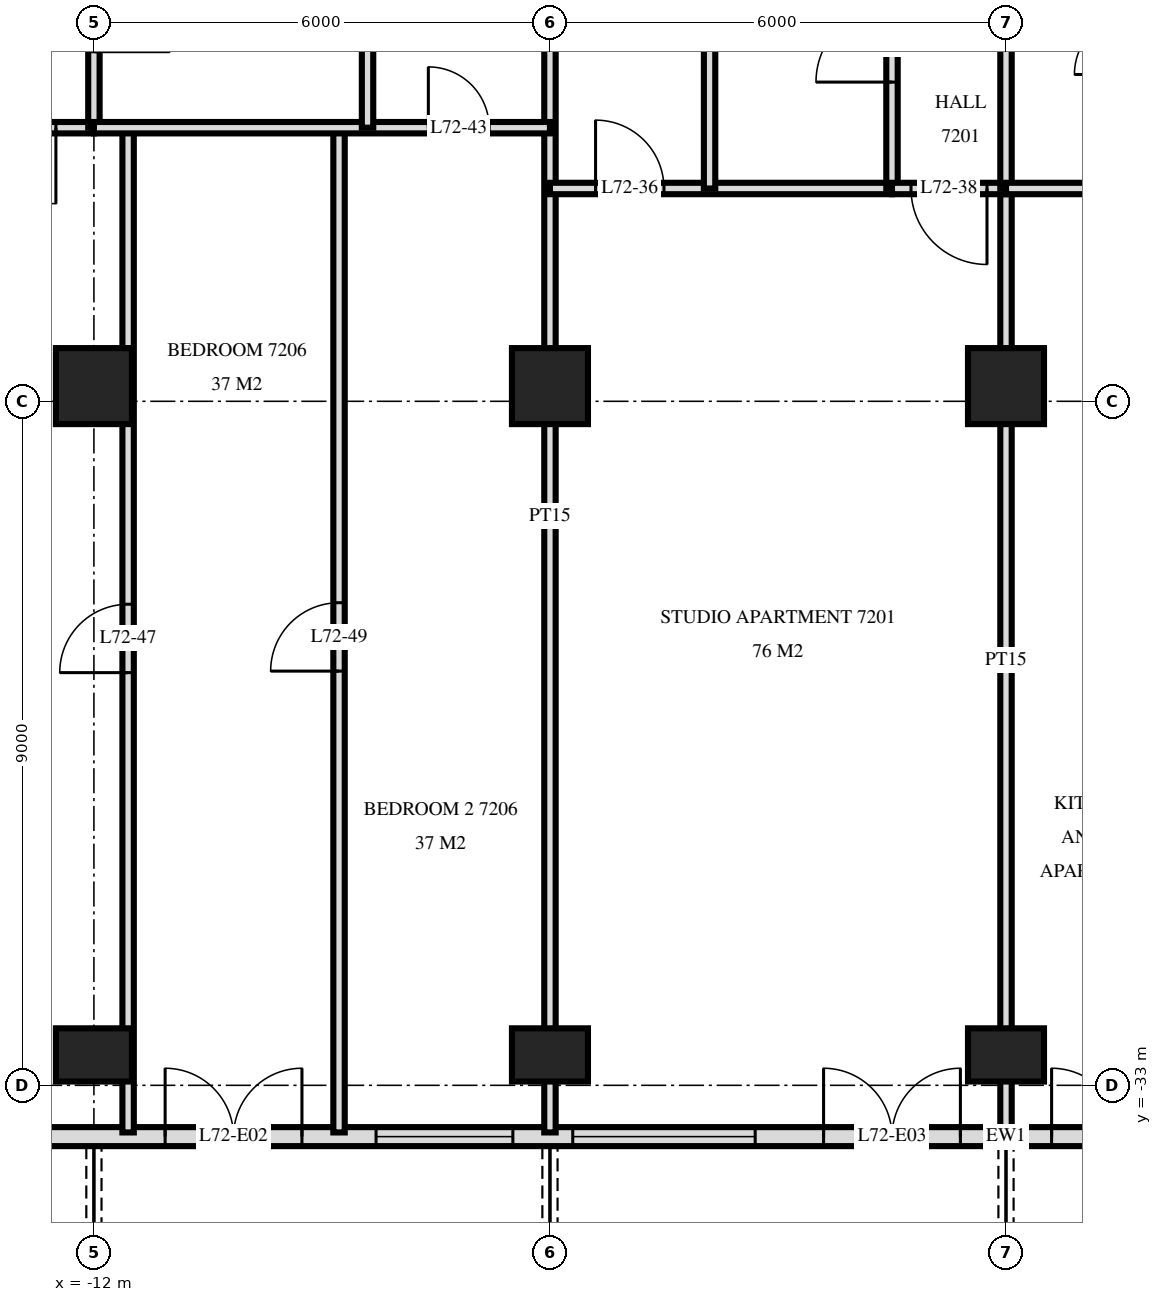
"""IFC4 building model, lengths in metres.
Left out: names, types, materials, properties, quantities, classifications, styles, units other than length and angle.
Written with IfcOpenShell. Run it as: python <this file> out.ifc"""

import sys

from ifc_helpers import new_model, si_unit, direction, frame, frame_2d, origin, origin_2d, place, context, subcontext, project, spatial, rectangle, extrude, element, fill, save


model = new_model("IFC4")
c1 = context("Model", 3, precision=1e-05, world=origin(), true_north=direction((0.0, 1.0)))
c2 = subcontext(c1, "Body", "Model", "MODEL_VIEW")
j1 = project(units=[si_unit("LENGTHUNIT", "METRE"), si_unit("PLANEANGLEUNIT", "RADIAN")], contexts=[c1])
p1 = place(None, origin())
s1 = spatial("IfcSite", under=j1, at=p1, CompositionType="ELEMENT")
p2 = place(p1, origin())
s2 = spatial("IfcBuilding", under=s1, at=p2, CompositionType="ELEMENT")
p3 = place(p2, frame((0.0, 0.0, 273.6)))
s3 = spatial("IfcBuildingStorey", under=s2, at=p3, CompositionType="ELEMENT", Elevation=273.6)
p4 = place(p3, frame((-12.0, -32.6, 0.0), z_axis=(0.0, 0.0, 1.0), x_axis=(1.0, 0.0, 0.0)))
e1 = element("IfcColumn", 1, at=p4, inside=s3, PredefinedType="COLUMN", context=c2, shape_type="SweptSolid", body=[
    extrude(rectangle(XDim=1.0, YDim=0.7, at=origin_2d()), origin(), (0.0, 0.0, 1.0), 3.5),
])
p5 = place(p3, frame((-12.0, -23.8, 0.0), z_axis=(0.0, 0.0, 1.0), x_axis=(1.0, 0.0, 0.0)))
e2 = element("IfcColumn", 2, at=p5, inside=s3, PredefinedType="COLUMN", context=c2, shape_type="SweptSolid", body=[
    extrude(rectangle(XDim=1.0, YDim=1.0, at=origin_2d()), origin(), (0.0, 0.0, 1.0), 3.5),
])
p6 = place(p3, frame((-6.0, -32.6, 0.0), z_axis=(0.0, 0.0, 1.0), x_axis=(1.0, 0.0, 0.0)))
e3 = element("IfcColumn", 3, at=p6, inside=s3, PredefinedType="COLUMN", context=c2, shape_type="SweptSolid", body=[
    extrude(rectangle(XDim=1.0, YDim=0.7, at=origin_2d()), origin(), (0.0, 0.0, 1.0), 3.5),
])
p7 = place(p3, frame((-6.0, -23.8, 0.0), z_axis=(0.0, 0.0, 1.0), x_axis=(1.0, 0.0, 0.0)))
e4 = element("IfcColumn", 4, at=p7, inside=s3, PredefinedType="COLUMN", context=c2, shape_type="SweptSolid", body=[
    extrude(rectangle(XDim=1.0, YDim=1.0, at=origin_2d()), origin(), (0.0, 0.0, 1.0), 3.5),
])
p8 = place(p3, frame((0.0, -32.6, 0.0), z_axis=(0.0, 0.0, 1.0), x_axis=(1.0, 0.0, 0.0)))
e5 = element("IfcColumn", 5, at=p8, inside=s3, PredefinedType="COLUMN", context=c2, shape_type="SweptSolid", body=[
    extrude(rectangle(XDim=1.0, YDim=0.7, at=origin_2d()), origin(), (0.0, 0.0, 1.0), 3.5),
])
p9 = place(p3, frame((0.0, -23.8, 0.0), z_axis=(0.0, 0.0, 1.0), x_axis=(1.0, 0.0, 0.0)))
e6 = element("IfcColumn", 6, at=p9, inside=s3, PredefinedType="COLUMN", context=c2, shape_type="SweptSolid", body=[
    extrude(rectangle(XDim=1.0, YDim=1.0, at=origin_2d()), origin(), (0.0, 0.0, 1.0), 3.5),
])
p10 = place(p3, frame((-18.575, -33.675, 0.0), z_axis=(0.0, 0.0, 1.0), x_axis=(1.0, 0.0, 0.0)))
e7 = element("IfcWall", 7, at=p10, inside=s3, PredefinedType="SOLIDWALL", context=c2, shape_type="SweptSolid", body=[
    extrude(rectangle(XDim=37.151, YDim=0.25, at=frame_2d((18.575, 0.0))), origin(), (0.0, 0.0, 1.0), 3.22),
])
p11 = place(p10, frame((4.175, 0.0, 0.0)))
e8 = element("IfcOpeningElement", 8, at=p11, cuts=e7, PredefinedType="OPENING", context=c2, shape_type="SweptSolid", body=[
    extrude(rectangle(XDim=1.8, YDim=2.4, at=frame_2d((0.9, 1.2))), frame((0.0, 0.135, 0.0), z_axis=(0.0, -1.0, 0.0), x_axis=(1.0, 0.0, 0.0)), (0.0, 0.0, 1.0), 0.27),
])
p12 = place(p10, frame((7.512, 0.0, 0.0)))
e9 = element("IfcOpeningElement", 9, at=p12, cuts=e7, PredefinedType="OPENING", context=c2, shape_type="SweptSolid", body=[
    extrude(rectangle(XDim=1.8, YDim=2.4, at=frame_2d((0.9, 1.2))), frame((0.0, 0.135, 0.0), z_axis=(0.0, -1.0, 0.0), x_axis=(1.0, 0.0, 0.0)), (0.0, 0.0, 1.0), 0.27),
])
p13 = place(p10, frame((10.287, 0.0, 0.9)))
e10 = element("IfcOpeningElement", 10, at=p13, cuts=e7, PredefinedType="OPENING", context=c2, shape_type="SweptSolid", body=[
    extrude(rectangle(XDim=1.8, YDim=1.5, at=frame_2d((0.9, 0.75))), frame((0.0, 0.135, 0.0), z_axis=(0.0, -1.0, 0.0), x_axis=(1.0, 0.0, 0.0)), (0.0, 0.0, 1.0), 0.27),
])
p14 = place(p10, frame((12.875, 0.0, 0.9)))
e11 = element("IfcOpeningElement", 11, at=p14, cuts=e7, PredefinedType="OPENING", context=c2, shape_type="SweptSolid", body=[
    extrude(rectangle(XDim=2.4, YDim=1.5, at=frame_2d((1.2, 0.75))), frame((0.0, 0.135, 0.0), z_axis=(0.0, -1.0, 0.0), x_axis=(1.0, 0.0, 0.0)), (0.0, 0.0, 1.0), 0.27),
])
p15 = place(p10, frame((16.175, 0.0, 0.0)))
e12 = element("IfcOpeningElement", 12, at=p15, cuts=e7, PredefinedType="OPENING", context=c2, shape_type="SweptSolid", body=[
    extrude(rectangle(XDim=1.8, YDim=2.4, at=frame_2d((0.9, 1.2))), frame((0.0, 0.135, 0.0), z_axis=(0.0, -1.0, 0.0), x_axis=(1.0, 0.0, 0.0)), (0.0, 0.0, 1.0), 0.27),
])
p16 = place(p10, frame((19.175, 0.0, 0.0)))
e13 = element("IfcOpeningElement", 13, at=p16, cuts=e7, PredefinedType="OPENING", context=c2, shape_type="SweptSolid", body=[
    extrude(rectangle(XDim=1.8, YDim=2.4, at=frame_2d((0.9, 1.2))), frame((0.0, 0.135, 0.0), z_axis=(0.0, -1.0, 0.0), x_axis=(1.0, 0.0, 0.0)), (0.0, 0.0, 1.0), 0.27),
])
p17 = place(p10, frame((21.875, 0.0, 0.9)))
e14 = element("IfcOpeningElement", 14, at=p17, cuts=e7, PredefinedType="OPENING", context=c2, shape_type="SweptSolid", body=[
    extrude(rectangle(XDim=2.4, YDim=1.5, at=frame_2d((1.2, 0.75))), frame((0.0, 0.135, 0.0), z_axis=(0.0, -1.0, 0.0), x_axis=(1.0, 0.0, 0.0)), (0.0, 0.0, 1.0), 0.27),
])
p18 = place(p10, frame((25.175, 0.0, 0.0)))
e15 = element("IfcOpeningElement", 15, at=p18, cuts=e7, PredefinedType="OPENING", context=c2, shape_type="SweptSolid", body=[
    extrude(rectangle(XDim=1.8, YDim=2.4, at=frame_2d((0.9, 1.2))), frame((0.0, 0.135, 0.0), z_axis=(0.0, -1.0, 0.0), x_axis=(1.0, 0.0, 0.0)), (0.0, 0.0, 1.0), 0.27),
])
p19 = place(p10, frame((27.875, 0.0, 0.9)))
e16 = element("IfcOpeningElement", 16, at=p19, cuts=e7, PredefinedType="OPENING", context=c2, shape_type="SweptSolid", body=[
    extrude(rectangle(XDim=2.4, YDim=1.5, at=frame_2d((1.2, 0.75))), frame((0.0, 0.135, 0.0), z_axis=(0.0, -1.0, 0.0), x_axis=(1.0, 0.0, 0.0)), (0.0, 0.0, 1.0), 0.27),
])
p20 = place(p10, frame((30.95, 0.0, 0.9)))
e17 = element("IfcOpeningElement", 17, at=p20, cuts=e7, PredefinedType="OPENING", context=c2, shape_type="SweptSolid", body=[
    extrude(rectangle(XDim=1.8, YDim=1.5, at=frame_2d((0.9, 0.75))), frame((0.0, 0.135, 0.0), z_axis=(0.0, -1.0, 0.0), x_axis=(1.0, 0.0, 0.0)), (0.0, 0.0, 1.0), 0.27),
])
p21 = place(p10, frame((34.175, 0.0, 0.0)))
e18 = element("IfcOpeningElement", 18, at=p21, cuts=e7, PredefinedType="OPENING", context=c2, shape_type="SweptSolid", body=[
    extrude(rectangle(XDim=1.8, YDim=2.4, at=frame_2d((0.9, 1.2))), frame((0.0, 0.135, 0.0), z_axis=(0.0, -1.0, 0.0), x_axis=(1.0, 0.0, 0.0)), (0.0, 0.0, 1.0), 0.27),
])
p22 = place(p3, frame((0.0, -21.2, 0.0), z_axis=(0.0, 0.0, 1.0), x_axis=(0.0, 1.0, 0.0)))
e19 = element("IfcWall", 19, at=p22, inside=s3, PredefinedType="PARTITIONING", context=c2, shape_type="SweptSolid", body=[
    extrude(rectangle(XDim=3.8, YDim=0.15, at=frame_2d((1.9, 0.0))), origin(), (0.0, 0.0, 1.0), 3.22),
])
p23 = place(p3, frame((0.0, -33.62, 0.0), z_axis=(0.0, 0.0, 1.0), x_axis=(0.0, 1.0, 0.0)))
e20 = element("IfcWall", 20, at=p23, inside=s3, PredefinedType="PARTITIONING", context=c2, shape_type="SweptSolid", body=[
    extrude(rectangle(XDim=12.42, YDim=0.15, at=frame_2d((6.21, 0.0))), origin(), (0.0, 0.0, 1.0), 3.22),
])
p24 = place(p3, frame((-1.5, -21.2, 0.0), z_axis=(0.0, 0.0, 1.0), x_axis=(0.0, 1.0, 0.0)))
e21 = element("IfcWall", 21, at=p24, inside=s3, PredefinedType="PARTITIONING", context=c2, shape_type="SweptSolid", body=[
    extrude(rectangle(XDim=3.8, YDim=0.15, at=frame_2d((1.9, 0.0))), origin(), (0.0, 0.0, 1.0), 3.22),
])
p25 = place(p24, frame((1.4, 0.0, 0.0)))
e22 = element("IfcOpeningElement", 22, at=p25, cuts=e21, PredefinedType="OPENING", context=c2, shape_type="SweptSolid", body=[
    extrude(rectangle(XDim=1.0, YDim=2.1, at=frame_2d((0.5, 1.05))), frame((0.0, 0.085, 0.0), z_axis=(0.0, -1.0, 0.0), x_axis=(1.0, 0.0, 0.0)), (0.0, 0.0, 1.0), 0.17),
])
p26 = place(p3, frame((-3.9, -21.2, 0.0), z_axis=(0.0, 0.0, 1.0), x_axis=(0.0, 1.0, 0.0)))
e23 = element("IfcWall", 23, at=p26, inside=s3, PredefinedType="PARTITIONING", context=c2, shape_type="SweptSolid", body=[
    extrude(rectangle(XDim=3.8, YDim=0.15, at=frame_2d((1.9, 0.0))), origin(), (0.0, 0.0, 1.0), 3.22),
])
p27 = place(p3, frame((-6.0, -33.62, 0.0), z_axis=(0.0, 0.0, 1.0), x_axis=(0.0, 1.0, 0.0)))
e24 = element("IfcWall", 24, at=p27, inside=s3, PredefinedType="PARTITIONING", context=c2, shape_type="SweptSolid", body=[
    extrude(rectangle(XDim=16.22, YDim=0.15, at=frame_2d((8.11, 0.0))), origin(), (0.0, 0.0, 1.0), 3.22),
])
p28 = place(p3, frame((-8.4, -20.4, 0.0), z_axis=(0.0, 0.0, 1.0), x_axis=(0.0, 1.0, 0.0)))
e25 = element("IfcWall", 25, at=p28, inside=s3, PredefinedType="PARTITIONING", context=c2, shape_type="SweptSolid", body=[
    extrude(rectangle(XDim=3.0, YDim=0.15, at=frame_2d((1.5, 0.0))), origin(), (0.0, 0.0, 1.0), 3.22),
])
p29 = place(p3, frame((-8.775, -33.62, 0.0), z_axis=(0.0, 0.0, 1.0), x_axis=(0.0, 1.0, 0.0)))
e26 = element("IfcWall", 26, at=p29, inside=s3, PredefinedType="PARTITIONING", context=c2, shape_type="SweptSolid", body=[
    extrude(rectangle(XDim=13.22, YDim=0.15, at=frame_2d((6.61, 0.0))), origin(), (0.0, 0.0, 1.0), 3.22),
])
p30 = place(p29, frame((6.07, 0.0, 0.0)))
e27 = element("IfcOpeningElement", 27, at=p30, cuts=e26, PredefinedType="OPENING", context=c2, shape_type="SweptSolid", body=[
    extrude(rectangle(XDim=0.9, YDim=2.1, at=frame_2d((0.45, 1.05))), frame((0.0, 0.085, 0.0), z_axis=(0.0, -1.0, 0.0), x_axis=(1.0, 0.0, 0.0)), (0.0, 0.0, 1.0), 0.17),
])
p31 = place(p3, frame((-11.55, -33.62, 0.0), z_axis=(0.0, 0.0, 1.0), x_axis=(0.0, 1.0, 0.0)))
e28 = element("IfcWall", 28, at=p31, inside=s3, PredefinedType="PARTITIONING", context=c2, shape_type="SweptSolid", body=[
    extrude(rectangle(XDim=13.22, YDim=0.15, at=frame_2d((6.61, 0.0))), origin(), (0.0, 0.0, 1.0), 3.22),
])
p32 = place(p31, frame((6.05, 0.0, 0.0)))
e29 = element("IfcOpeningElement", 29, at=p32, cuts=e28, PredefinedType="OPENING", context=c2, shape_type="SweptSolid", body=[
    extrude(rectangle(XDim=0.9, YDim=2.1, at=frame_2d((0.45, 1.05))), frame((0.0, 0.085, 0.0), z_axis=(0.0, -1.0, 0.0), x_axis=(1.0, 0.0, 0.0)), (0.0, 0.0, 1.0), 0.17),
])
p33 = place(p3, frame((-12.0, -20.4, 0.0), z_axis=(0.0, 0.0, 1.0), x_axis=(0.0, 1.0, 0.0)))
e30 = element("IfcWall", 30, at=p33, inside=s3, PredefinedType="PARTITIONING", context=c2, shape_type="SweptSolid", body=[
    extrude(rectangle(XDim=3.0, YDim=0.15, at=frame_2d((1.5, 0.0))), origin(), (0.0, 0.0, 1.0), 3.22),
])
p34 = place(p33, frame((1.0, 0.0, 0.0)))
e31 = element("IfcOpeningElement", 31, at=p34, cuts=e30, PredefinedType="OPENING", context=c2, shape_type="SweptSolid", body=[
    extrude(rectangle(XDim=1.0, YDim=2.1, at=frame_2d((0.5, 1.05))), frame((0.0, 0.085, 0.0), z_axis=(0.0, -1.0, 0.0), x_axis=(1.0, 0.0, 0.0)), (0.0, 0.0, 1.0), 0.17),
])
p35 = place(p3, frame((-1.5, -21.2, 0.0), z_axis=(0.0, 0.0, 1.0), x_axis=(1.0, 0.0, 0.0)))
e32 = element("IfcWall", 32, at=p35, inside=s3, PredefinedType="PARTITIONING", context=c2, shape_type="SweptSolid", body=[
    extrude(rectangle(XDim=1.5, YDim=0.15, at=frame_2d((0.75, 0.0))), origin(), (0.0, 0.0, 1.0), 3.22),
])
p36 = place(p35, frame((0.25, 0.0, 0.0)))
e33 = element("IfcOpeningElement", 33, at=p36, cuts=e32, PredefinedType="OPENING", context=c2, shape_type="SweptSolid", body=[
    extrude(rectangle(XDim=1.0, YDim=2.1, at=frame_2d((0.5, 1.05))), frame((0.0, 0.085, 0.0), z_axis=(0.0, -1.0, 0.0), x_axis=(1.0, 0.0, 0.0)), (0.0, 0.0, 1.0), 0.17),
])
p37 = place(p3, frame((-6.0, -21.2, 0.0), z_axis=(0.0, 0.0, 1.0), x_axis=(1.0, 0.0, 0.0)))
e34 = element("IfcWall", 34, at=p37, inside=s3, PredefinedType="PARTITIONING", context=c2, shape_type="SweptSolid", body=[
    extrude(rectangle(XDim=4.5, YDim=0.15, at=frame_2d((2.25, 0.0))), origin(), (0.0, 0.0, 1.0), 3.22),
])
p38 = place(p37, frame((0.6, 0.0, 0.0)))
e35 = element("IfcOpeningElement", 35, at=p38, cuts=e34, PredefinedType="OPENING", context=c2, shape_type="SweptSolid", body=[
    extrude(rectangle(XDim=0.9, YDim=2.1, at=frame_2d((0.45, 1.05))), frame((0.0, 0.085, 0.0), z_axis=(0.0, -1.0, 0.0), x_axis=(1.0, 0.0, 0.0)), (0.0, 0.0, 1.0), 0.17),
])
p39 = place(p3, frame((0.0, -21.2, 0.0), z_axis=(0.0, 0.0, 1.0), x_axis=(1.0, 0.0, 0.0)))
e36 = element("IfcWall", 36, at=p39, inside=s3, PredefinedType="PARTITIONING", context=c2, shape_type="SweptSolid", body=[
    extrude(rectangle(XDim=1.7, YDim=0.15, at=frame_2d((0.85, 0.0))), origin(), (0.0, 0.0, 1.0), 3.22),
])
p40 = place(p3, frame((-14.0, -20.4, 0.0), z_axis=(0.0, 0.0, 1.0), x_axis=(1.0, 0.0, 0.0)))
e37 = element("IfcWall", 37, at=p40, inside=s3, PredefinedType="PARTITIONING", context=c2, shape_type="SweptSolid", body=[
    extrude(rectangle(XDim=2.0, YDim=0.15, at=frame_2d((1.0, 0.0))), origin(), (0.0, 0.0, 1.0), 3.22),
])
p41 = place(p40, frame((0.5, 0.0, 0.0)))
e38 = element("IfcOpeningElement", 38, at=p41, cuts=e37, PredefinedType="OPENING", context=c2, shape_type="SweptSolid", body=[
    extrude(rectangle(XDim=1.0, YDim=2.1, at=frame_2d((0.5, 1.05))), frame((0.0, 0.085, 0.0), z_axis=(0.0, -1.0, 0.0), x_axis=(1.0, 0.0, 0.0)), (0.0, 0.0, 1.0), 0.17),
])
p42 = place(p3, frame((-12.0, -20.4, 0.0), z_axis=(0.0, 0.0, 1.0), x_axis=(1.0, 0.0, 0.0)))
e39 = element("IfcWall", 39, at=p42, inside=s3, PredefinedType="PARTITIONING", context=c2, shape_type="SweptSolid", body=[
    extrude(rectangle(XDim=6.0, YDim=0.15, at=frame_2d((3.0, 0.0))), origin(), (0.0, 0.0, 1.0), 3.22),
])
p43 = place(p42, frame((4.4, 0.0, 0.0)))
e40 = element("IfcOpeningElement", 40, at=p43, cuts=e39, PredefinedType="OPENING", context=c2, shape_type="SweptSolid", body=[
    extrude(rectangle(XDim=0.8, YDim=2.1, at=frame_2d((0.4, 1.05))), frame((0.0, 0.085, 0.0), z_axis=(0.0, -1.0, 0.0), x_axis=(1.0, 0.0, 0.0)), (0.0, 0.0, 1.0), 0.17),
])
p44 = place(p12, origin())
e41 = element("IfcDoor", 41, at=p44, inside=s3, OperationType="DOUBLE_DOOR_SINGLE_SWING", PredefinedType="DOOR", context=c2, shape_type="SweptSolid", body=[
    extrude(rectangle(XDim=1.8, YDim=2.4, at=frame_2d((0.9, 1.2))), frame((0.0, 0.025, 0.0), z_axis=(0.0, -1.0, 0.0), x_axis=(1.0, 0.0, 0.0)), (0.0, 0.0, 1.0), 0.05),
])
fill(e9, e41)
p45 = place(p13, origin())
e42 = element("IfcWindow", 42, at=p45, inside=s3, PartitioningType="SINGLE_PANEL", PredefinedType="WINDOW", context=c2, shape_type="SweptSolid", body=[
    extrude(rectangle(XDim=1.8, YDim=1.5, at=frame_2d((0.9, 0.75))), frame((0.0, 0.03, 0.0), z_axis=(0.0, -1.0, 0.0), x_axis=(1.0, 0.0, 0.0)), (0.0, 0.0, 1.0), 0.06),
])
fill(e10, e42)
p46 = place(p14, origin())
e43 = element("IfcWindow", 43, at=p46, inside=s3, PartitioningType="SINGLE_PANEL", PredefinedType="WINDOW", context=c2, shape_type="SweptSolid", body=[
    extrude(rectangle(XDim=2.4, YDim=1.5, at=frame_2d((1.2, 0.75))), frame((0.0, 0.03, 0.0), z_axis=(0.0, -1.0, 0.0), x_axis=(1.0, 0.0, 0.0)), (0.0, 0.0, 1.0), 0.06),
])
fill(e11, e43)
p47 = place(p15, origin())
e44 = element("IfcDoor", 44, at=p47, inside=s3, OperationType="DOUBLE_DOOR_SINGLE_SWING", PredefinedType="DOOR", context=c2, shape_type="SweptSolid", body=[
    extrude(rectangle(XDim=1.8, YDim=2.4, at=frame_2d((0.9, 1.2))), frame((0.0, 0.025, 0.0), z_axis=(0.0, -1.0, 0.0), x_axis=(1.0, 0.0, 0.0)), (0.0, 0.0, 1.0), 0.05),
])
fill(e12, e44)
p48 = place(p16, origin())
e45 = element("IfcDoor", 45, at=p48, inside=s3, OperationType="DOUBLE_DOOR_SINGLE_SWING", PredefinedType="DOOR", context=c2, shape_type="SweptSolid", body=[
    extrude(rectangle(XDim=1.8, YDim=2.4, at=frame_2d((0.9, 1.2))), frame((0.0, 0.025, 0.0), z_axis=(0.0, -1.0, 0.0), x_axis=(1.0, 0.0, 0.0)), (0.0, 0.0, 1.0), 0.05),
])
fill(e13, e45)
p49 = place(p38, origin())
e46 = element("IfcDoor", 46, at=p49, inside=s3, OperationType="SINGLE_SWING_RIGHT", PredefinedType="DOOR", context=c2, shape_type="SweptSolid", body=[
    extrude(rectangle(XDim=0.9, YDim=2.1, at=frame_2d((0.45, 1.05))), frame((0.0, 0.025, 0.0), z_axis=(0.0, -1.0, 0.0), x_axis=(1.0, 0.0, 0.0)), (0.0, 0.0, 1.0), 0.05),
])
fill(e35, e46)
p50 = place(p25, origin())
e47 = element("IfcDoor", 47, at=p50, inside=s3, OperationType="SINGLE_SWING_RIGHT", PredefinedType="DOOR", context=c2, shape_type="SweptSolid", body=[
    extrude(rectangle(XDim=1.0, YDim=2.1, at=frame_2d((0.5, 1.05))), frame((0.0, 0.025, 0.0), z_axis=(0.0, -1.0, 0.0), x_axis=(1.0, 0.0, 0.0)), (0.0, 0.0, 1.0), 0.05),
])
fill(e22, e47)
p51 = place(p36, frame((0.5, 0.0, 0.0), z_axis=(0.0, 0.0, 1.0), x_axis=(-1.0, 0.0, 0.0)))
e48 = element("IfcDoor", 48, at=p51, inside=s3, OperationType="SINGLE_SWING_RIGHT", PredefinedType="DOOR", context=c2, shape_type="SweptSolid", body=[
    extrude(rectangle(XDim=1.0, YDim=2.1, at=frame_2d((0.0, 1.05))), frame((0.0, -0.025, 0.0), z_axis=(0.0, 1.0, 0.0), x_axis=(-1.0, 0.0, 0.0)), (0.0, 0.0, 1.0), 0.05),
])
fill(e33, e48)
p52 = place(p43, origin())
e49 = element("IfcDoor", 49, at=p52, inside=s3, OperationType="SINGLE_SWING_RIGHT", PredefinedType="DOOR", context=c2, shape_type="SweptSolid", body=[
    extrude(rectangle(XDim=0.8, YDim=2.1, at=frame_2d((0.4, 1.05))), frame((0.0, 0.025, 0.0), z_axis=(0.0, -1.0, 0.0), x_axis=(1.0, 0.0, 0.0)), (0.0, 0.0, 1.0), 0.05),
])
fill(e40, e49)
p53 = place(p41, frame((0.5, 0.0, 0.0), z_axis=(0.0, 0.0, 1.0), x_axis=(-1.0, 0.0, 0.0)))
e50 = element("IfcDoor", 50, at=p53, inside=s3, OperationType="SINGLE_SWING_RIGHT", PredefinedType="DOOR", context=c2, shape_type="SweptSolid", body=[
    extrude(rectangle(XDim=1.0, YDim=2.1, at=frame_2d((0.0, 1.05))), frame((0.0, -0.025, 0.0), z_axis=(0.0, 1.0, 0.0), x_axis=(-1.0, 0.0, 0.0)), (0.0, 0.0, 1.0), 0.05),
])
fill(e38, e50)
p54 = place(p32, origin())
e51 = element("IfcDoor", 51, at=p54, inside=s3, OperationType="SINGLE_SWING_RIGHT", PredefinedType="DOOR", context=c2, shape_type="SweptSolid", body=[
    extrude(rectangle(XDim=0.9, YDim=2.1, at=frame_2d((0.45, 1.05))), frame((0.0, 0.025, 0.0), z_axis=(0.0, -1.0, 0.0), x_axis=(1.0, 0.0, 0.0)), (0.0, 0.0, 1.0), 0.05),
])
fill(e29, e51)
p55 = place(p30, origin())
e52 = element("IfcDoor", 52, at=p55, inside=s3, OperationType="SINGLE_SWING_RIGHT", PredefinedType="DOOR", context=c2, shape_type="SweptSolid", body=[
    extrude(rectangle(XDim=0.9, YDim=2.1, at=frame_2d((0.45, 1.05))), frame((0.0, 0.025, 0.0), z_axis=(0.0, -1.0, 0.0), x_axis=(1.0, 0.0, 0.0)), (0.0, 0.0, 1.0), 0.05),
])
fill(e27, e52)
save(model, sys.argv[1])
